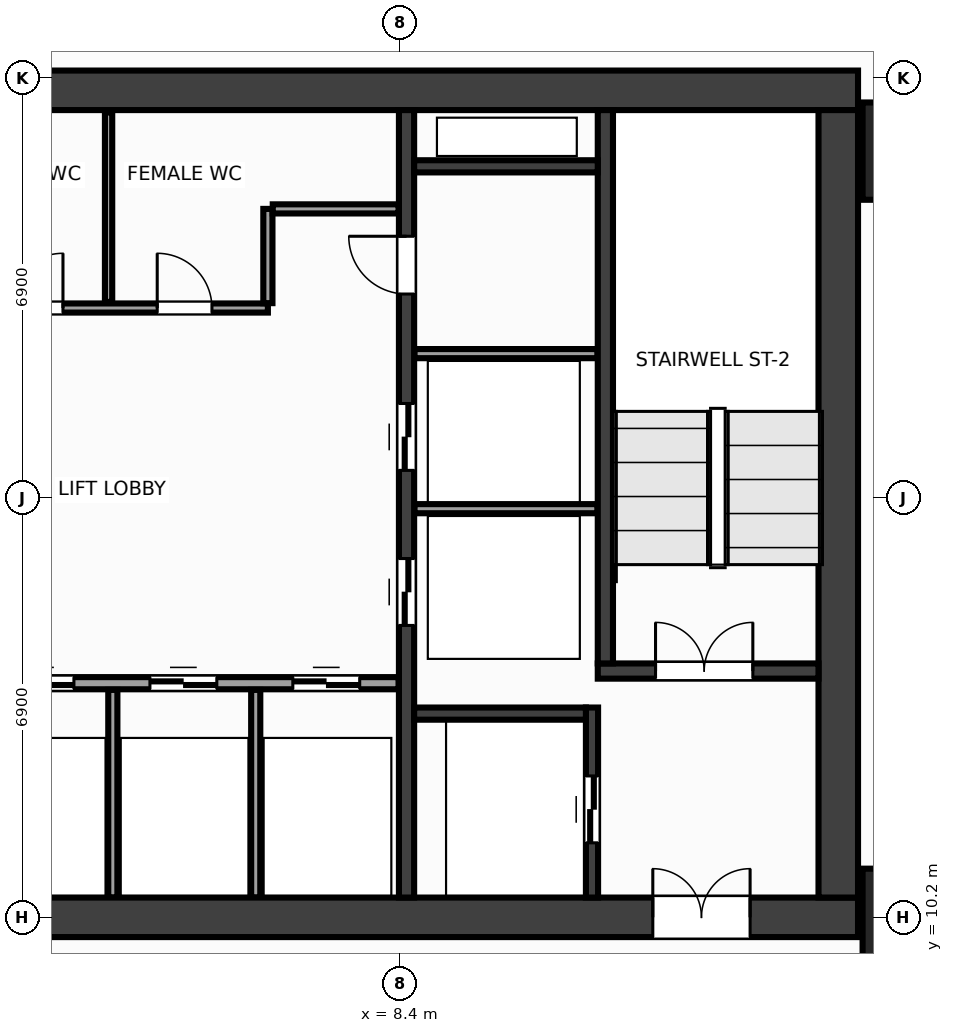
"""IFC4 building model, lengths in metres.
Left out: names, types, materials, properties, quantities, classifications, styles, units other than length and angle.
Written with IfcOpenShell. Run it as: python <this file> out.ifc"""

import sys

from ifc_helpers import new_model, si_unit, direction, frame, frame_2d, origin, origin_2d, place, context, subcontext, project, spatial, rectangle, extrude, source, transform, mapped, element, fill, save


model = new_model("IFC4")
c1 = context("Model", 3, precision=1e-05, world=origin(), true_north=direction((0.0, 1.0)))
c2 = subcontext(c1, "Body", "Model", "MODEL_VIEW")
j1 = project(units=[si_unit("LENGTHUNIT", "METRE"), si_unit("PLANEANGLEUNIT", "RADIAN")], contexts=[c1])
p1 = place(None, origin())
s1 = spatial("IfcSite", under=j1, at=p1, CompositionType="ELEMENT")
p2 = place(p1, origin())
s2 = spatial("IfcBuilding", under=s1, at=p2, CompositionType="ELEMENT")
p3 = place(p2, frame((0.0, 0.0, 131.6)))
s3 = spatial("IfcBuildingStorey", under=s2, at=p3, CompositionType="ELEMENT", Elevation=131.6)
m1 = source(origin(), c2, "Body", "SweptSolid", [
    extrude(rectangle(XDim=31.85, YDim=0.65, at=frame_2d((15.925, 0.0))), origin(), (0.0, 0.0, 1.0), 3.6),
])
p4 = place(p3, frame((-15.925, 23.8, 0.0), z_axis=(0.0, 0.0, 1.0), x_axis=(1.0, 0.0, 0.0)))
e1 = element("IfcWall", 1, at=p4, inside=s3, PredefinedType="SHEAR", context=c2, shape_type="MappedRepresentation", body=[
    mapped(m1, transform((0.0, 0.0, 0.0), x_axis=(1.0, 0.0, 0.0), y_axis=(0.0, 1.0, 0.0), z_axis=(0.0, 0.0, 1.0), scale=1.0)),
])
p5 = place(p3, frame((-15.925, 10.2, 0.0), z_axis=(0.0, 0.0, 1.0), x_axis=(1.0, 0.0, 0.0)))
e2 = element("IfcWall", 2, at=p5, inside=s3, PredefinedType="SHEAR", context=c2, shape_type="MappedRepresentation", body=[
    mapped(m1, transform((0.0, 0.0, 0.0), x_axis=(1.0, 0.0, 0.0), y_axis=(0.0, 1.0, 0.0), z_axis=(0.0, 0.0, 1.0), scale=1.0)),
])
p6 = place(p5, frame((1.775, 0.0, 0.0)))
e3 = element("IfcOpeningElement", 3, at=p6, cuts=e2, PredefinedType="OPENING", context=c2, shape_type="SweptSolid", body=[
    extrude(rectangle(XDim=1.6, YDim=2.15, at=frame_2d((0.8, 1.075))), frame((0.0, 0.337, 0.0), z_axis=(0.0, -1.0, 0.0), x_axis=(1.0, 0.0, 0.0)), (0.0, 0.0, 1.0), 0.674),
])
p7 = place(p5, frame((28.475, 0.0, 0.0)))
e4 = element("IfcOpeningElement", 4, at=p7, cuts=e2, PredefinedType="OPENING", context=c2, shape_type="SweptSolid", body=[
    extrude(rectangle(XDim=1.6, YDim=2.15, at=frame_2d((0.8, 1.075))), frame((0.0, 0.337, 0.0), z_axis=(0.0, -1.0, 0.0), x_axis=(1.0, 0.0, 0.0)), (0.0, 0.0, 1.0), 0.674),
])
p8 = place(p5, frame((15.175, 0.0, 0.0)))
e5 = element("IfcOpeningElement", 5, at=p8, cuts=e2, PredefinedType="OPENING", context=c2, shape_type="SweptSolid", body=[
    extrude(rectangle(XDim=1.5, YDim=2.2, at=frame_2d((0.75, 1.1))), frame((0.0, 0.337, 0.0), z_axis=(0.0, -1.0, 0.0), x_axis=(1.0, 0.0, 0.0)), (0.0, 0.0, 1.0), 0.674),
])
m2 = source(origin(), c2, "Body", "SweptSolid", [
    extrude(rectangle(XDim=12.95, YDim=0.65, at=frame_2d((6.475, 0.0))), origin(), (0.0, 0.0, 1.0), 3.6),
])
p9 = place(p3, frame((15.6, 10.525, 0.0), z_axis=(0.0, 0.0, 1.0), x_axis=(0.0, 1.0, 0.0)))
e6 = element("IfcWall", 6, at=p9, inside=s3, PredefinedType="SHEAR", context=c2, shape_type="MappedRepresentation", body=[
    mapped(m2, transform((0.0, 0.0, 0.0), x_axis=(1.0, 0.0, 0.0), y_axis=(0.0, 1.0, 0.0), z_axis=(0.0, 0.0, 1.0), scale=1.0)),
])
m3 = source(origin(), c2, "Body", "SweptSolid", [
    extrude(rectangle(XDim=12.95, YDim=0.25, at=frame_2d((6.475, 0.0))), origin(), (0.0, 0.0, 1.0), 3.6),
])
p10 = place(p3, frame((8.5, 10.525, 0.0), z_axis=(0.0, 0.0, 1.0), x_axis=(0.0, 1.0, 0.0)))
e7 = element("IfcWall", 7, at=p10, inside=s3, PredefinedType="SHEAR", context=c2, shape_type="MappedRepresentation", body=[
    mapped(m3, transform((0.0, 0.0, 0.0), x_axis=(1.0, 0.0, 0.0), y_axis=(0.0, 1.0, 0.0), z_axis=(0.0, 0.0, 1.0), scale=1.0)),
])
p11 = place(p10, frame((4.475, 0.0, 0.0)))
e8 = element("IfcOpeningElement", 8, at=p11, cuts=e7, PredefinedType="OPENING", context=c2, shape_type="SweptSolid", body=[
    extrude(rectangle(XDim=1.1, YDim=2.15, at=frame_2d((0.55, 1.075))), frame((0.0, 0.137, 0.0), z_axis=(0.0, -1.0, 0.0), x_axis=(1.0, 0.0, 0.0)), (0.0, 0.0, 1.0), 0.274),
])
p12 = place(p10, frame((7.025, 0.0, 0.0)))
e9 = element("IfcOpeningElement", 9, at=p12, cuts=e7, PredefinedType="OPENING", context=c2, shape_type="SweptSolid", body=[
    extrude(rectangle(XDim=1.1, YDim=2.15, at=frame_2d((0.55, 1.075))), frame((0.0, 0.137, 0.0), z_axis=(0.0, -1.0, 0.0), x_axis=(1.0, 0.0, 0.0)), (0.0, 0.0, 1.0), 0.274),
])
p13 = place(p10, frame((9.925, 0.0, 0.0)))
e10 = element("IfcOpeningElement", 10, at=p13, cuts=e7, PredefinedType="OPENING", context=c2, shape_type="SweptSolid", body=[
    extrude(rectangle(XDim=0.95, YDim=2.15, at=frame_2d((0.475, 1.075))), frame((0.0, 0.137, 0.0), z_axis=(0.0, -1.0, 0.0), x_axis=(1.0, 0.0, 0.0)), (0.0, 0.0, 1.0), 0.274),
])
m4 = source(origin(), c2, "Body", "SweptSolid", [
    extrude(rectangle(XDim=3.63, YDim=0.25, at=frame_2d((1.815, 0.0))), origin(), (0.0, 0.0, 1.0), 3.6),
])
p14 = place(p3, frame((11.645, 14.25, 0.0), z_axis=(0.0, 0.0, 1.0), x_axis=(1.0, 0.0, 0.0)))
e11 = element("IfcWall", 11, at=p14, inside=s3, PredefinedType="SHEAR", context=c2, shape_type="MappedRepresentation", body=[
    mapped(m4, transform((0.0, 0.0, 0.0), x_axis=(1.0, 0.0, 0.0), y_axis=(0.0, 1.0, 0.0), z_axis=(0.0, 0.0, 1.0), scale=1.0)),
])
p15 = place(p14, frame((0.95, 0.0, 0.0)))
e12 = element("IfcOpeningElement", 12, at=p15, cuts=e11, PredefinedType="OPENING", context=c2, shape_type="SweptSolid", body=[
    extrude(rectangle(XDim=1.6, YDim=2.15, at=frame_2d((0.8, 1.075))), frame((0.0, 0.137, 0.0), z_axis=(0.0, -1.0, 0.0), x_axis=(1.0, 0.0, 0.0)), (0.0, 0.0, 1.0), 0.274),
])
m5 = source(origin(), c2, "Body", "SweptSolid", [
    extrude(rectangle(XDim=9.1, YDim=0.25, at=frame_2d((4.55, 0.0))), origin(), (0.0, 0.0, 1.0), 3.6),
])
p16 = place(p3, frame((11.77, 14.375, 0.0), z_axis=(0.0, 0.0, 1.0), x_axis=(0.0, 1.0, 0.0)))
e13 = element("IfcWall", 13, at=p16, inside=s3, PredefinedType="SHEAR", context=c2, shape_type="MappedRepresentation", body=[
    mapped(m5, transform((0.0, 0.0, 0.0), x_axis=(1.0, 0.0, 0.0), y_axis=(0.0, 1.0, 0.0), z_axis=(0.0, 0.0, 1.0), scale=1.0)),
])
m6 = source(origin(), c2, "Body", "SweptSolid", [
    extrude(rectangle(XDim=3.125, YDim=0.2, at=frame_2d((1.562, 0.0))), origin(), (0.0, 0.0, 1.0), 3.6),
])
p17 = place(p3, frame((11.55, 10.525, 0.0), z_axis=(0.0, 0.0, 1.0), x_axis=(0.0, 1.0, 0.0)))
e14 = element("IfcWall", 14, at=p17, inside=s3, PredefinedType="SHEAR", context=c2, shape_type="MappedRepresentation", body=[
    mapped(m6, transform((0.0, 0.0, 0.0), x_axis=(1.0, 0.0, 0.0), y_axis=(0.0, 1.0, 0.0), z_axis=(0.0, 0.0, 1.0), scale=1.0)),
])
p18 = place(p17, frame((0.9, 0.0, 0.0)))
e15 = element("IfcOpeningElement", 15, at=p18, cuts=e14, PredefinedType="OPENING", context=c2, shape_type="SweptSolid", body=[
    extrude(rectangle(XDim=1.1, YDim=2.15, at=frame_2d((0.55, 1.075))), frame((0.0, 0.112, 0.0), z_axis=(0.0, -1.0, 0.0), x_axis=(1.0, 0.0, 0.0)), (0.0, 0.0, 1.0), 0.224),
])
m7 = source(origin(), c2, "Body", "SweptSolid", [
    extrude(rectangle(XDim=2.825, YDim=0.2, at=frame_2d((1.413, 0.0))), origin(), (0.0, 0.0, 1.0), 3.6),
])
p19 = place(p3, frame((8.625, 13.55, 0.0), z_axis=(0.0, 0.0, 1.0), x_axis=(1.0, 0.0, 0.0)))
e16 = element("IfcWall", 16, at=p19, inside=s3, PredefinedType="SHEAR", context=c2, shape_type="MappedRepresentation", body=[
    mapped(m7, transform((0.0, 0.0, 0.0), x_axis=(1.0, 0.0, 0.0), y_axis=(0.0, 1.0, 0.0), z_axis=(0.0, 0.0, 1.0), scale=1.0)),
])
m8 = source(origin(), c2, "Body", "SweptSolid", [
    extrude(rectangle(XDim=3.02, YDim=0.2, at=frame_2d((1.51, 0.0))), origin(), (0.0, 0.0, 1.0), 3.6),
])
p20 = place(p3, frame((8.625, 22.55, 0.0), z_axis=(0.0, 0.0, 1.0), x_axis=(1.0, 0.0, 0.0)))
e17 = element("IfcWall", 17, at=p20, inside=s3, PredefinedType="SHEAR", context=c2, shape_type="MappedRepresentation", body=[
    mapped(m8, transform((0.0, 0.0, 0.0), x_axis=(1.0, 0.0, 0.0), y_axis=(0.0, 1.0, 0.0), z_axis=(0.0, 0.0, 1.0), scale=1.0)),
])
m9 = source(origin(), c2, "Body", "SweptSolid", [
    extrude(rectangle(XDim=1.6, YDim=1.6, at=origin_2d()), origin(), (0.0, 0.0, 1.0), 3.6),
])
for number, where, z_axis, x_axis in (
    (18, (16.8, 10.2, 0.0), (0.0, 0.0, 1.0), (1.0, 0.0, 0.0)),
    (19, (16.8, 22.8, 0.0), (0.0, 0.0, 1.0), (1.0, 0.0, 0.0)),
):
    element("IfcColumn", number, at=place(p3, frame(where, z_axis=z_axis, x_axis=x_axis)), inside=s3, PredefinedType="COLUMN", context=c2, shape_type="MappedRepresentation", body=[
        mapped(m9, transform((0.0, 0.0, 0.0), x_axis=(1.0, 0.0, 0.0), y_axis=(0.0, 1.0, 0.0), z_axis=(0.0, 0.0, 1.0), scale=1.0)),
    ])
m10 = source(origin(), c2, "Body", "SweptSolid", [
    extrude(rectangle(XDim=3.01, YDim=0.15, at=frame_2d((1.505, 0.0))), origin(), (0.0, 0.0, 1.0), 3.38),
])
for number, where, z_axis, x_axis in (
    (20, (8.63, 16.92, 0.0), (0.0, 0.0, 1.0), (1.0, 0.0, 0.0)),
    (21, (8.63, 19.47, 0.0), (0.0, 0.0, 1.0), (1.0, 0.0, 0.0)),
):
    element("IfcWall", number, at=place(p3, frame(where, z_axis=z_axis, x_axis=x_axis)), inside=s3, PredefinedType="PARTITIONING", context=c2, shape_type="MappedRepresentation", body=[
        mapped(m10, transform((0.0, 0.0, 0.0), x_axis=(1.0, 0.0, 0.0), y_axis=(0.0, 1.0, 0.0), z_axis=(0.0, 0.0, 1.0), scale=1.0)),
    ])
m11 = source(origin(), c2, "Body", "SweptSolid", [
    extrude(rectangle(XDim=7.07, YDim=0.2, at=frame_2d((3.535, 0.0))), origin(), (0.0, 0.0, 1.0), 3.38),
])
p21 = place(p3, frame((1.3, 14.05, 0.0), z_axis=(0.0, 0.0, 1.0), x_axis=(1.0, 0.0, 0.0)))
e22 = element("IfcWall", 22, at=p21, inside=s3, PredefinedType="PARTITIONING", context=c2, shape_type="MappedRepresentation", body=[
    mapped(m11, transform((0.0, 0.0, 0.0), x_axis=(1.0, 0.0, 0.0), y_axis=(0.0, 1.0, 0.0), z_axis=(0.0, 0.0, 1.0), scale=1.0)),
])
p22 = place(p21, frame((0.63, 0.0, 0.0)))
e23 = element("IfcOpeningElement", 23, at=p22, cuts=e22, PredefinedType="OPENING", context=c2, shape_type="SweptSolid", body=[
    extrude(rectangle(XDim=1.1, YDim=2.15, at=frame_2d((0.55, 1.075))), frame((0.0, 0.112, 0.0), z_axis=(0.0, -1.0, 0.0), x_axis=(1.0, 0.0, 0.0)), (0.0, 0.0, 1.0), 0.224),
])
p23 = place(p21, frame((2.98, 0.0, 0.0)))
e24 = element("IfcOpeningElement", 24, at=p23, cuts=e22, PredefinedType="OPENING", context=c2, shape_type="SweptSolid", body=[
    extrude(rectangle(XDim=1.1, YDim=2.15, at=frame_2d((0.55, 1.075))), frame((0.0, 0.112, 0.0), z_axis=(0.0, -1.0, 0.0), x_axis=(1.0, 0.0, 0.0)), (0.0, 0.0, 1.0), 0.224),
])
p24 = place(p21, frame((5.33, 0.0, 0.0)))
e25 = element("IfcOpeningElement", 25, at=p24, cuts=e22, PredefinedType="OPENING", context=c2, shape_type="SweptSolid", body=[
    extrude(rectangle(XDim=1.1, YDim=2.15, at=frame_2d((0.55, 1.075))), frame((0.0, 0.112, 0.0), z_axis=(0.0, -1.0, 0.0), x_axis=(1.0, 0.0, 0.0)), (0.0, 0.0, 1.0), 0.224),
])
m12 = source(origin(), c2, "Body", "SweptSolid", [
    extrude(rectangle(XDim=14.59, YDim=0.15, at=frame_2d((7.295, 0.0))), origin(), (0.0, 0.0, 1.0), 3.38),
])
p25 = place(p3, frame((-8.37, 20.22, 0.0), z_axis=(0.0, 0.0, 1.0), x_axis=(1.0, 0.0, 0.0)))
e26 = element("IfcWall", 26, at=p25, inside=s3, PredefinedType="PARTITIONING", context=c2, shape_type="MappedRepresentation", body=[
    mapped(m12, transform((0.0, 0.0, 0.0), x_axis=(1.0, 0.0, 0.0), y_axis=(0.0, 1.0, 0.0), z_axis=(0.0, 0.0, 1.0), scale=1.0)),
])
p26 = place(p25, frame((4.36, 0.0, 0.0)))
e27 = element("IfcOpeningElement", 27, at=p26, cuts=e26, PredefinedType="OPENING", context=c2, shape_type="SweptSolid", body=[
    extrude(rectangle(XDim=0.9, YDim=2.15, at=frame_2d((0.45, 1.075))), frame((0.0, 0.087, 0.0), z_axis=(0.0, -1.0, 0.0), x_axis=(1.0, 0.0, 0.0)), (0.0, 0.0, 1.0), 0.174),
])
p27 = place(p25, frame((10.32, 0.0, 0.0)))
e28 = element("IfcOpeningElement", 28, at=p27, cuts=e26, PredefinedType="OPENING", context=c2, shape_type="SweptSolid", body=[
    extrude(rectangle(XDim=0.9, YDim=2.15, at=frame_2d((0.45, 1.075))), frame((0.0, 0.087, 0.0), z_axis=(0.0, -1.0, 0.0), x_axis=(1.0, 0.0, 0.0)), (0.0, 0.0, 1.0), 0.174),
])
p28 = place(p25, frame((12.77, 0.0, 0.0)))
e29 = element("IfcOpeningElement", 29, at=p28, cuts=e26, PredefinedType="OPENING", context=c2, shape_type="SweptSolid", body=[
    extrude(rectangle(XDim=0.9, YDim=2.15, at=frame_2d((0.45, 1.075))), frame((0.0, 0.087, 0.0), z_axis=(0.0, -1.0, 0.0), x_axis=(1.0, 0.0, 0.0)), (0.0, 0.0, 1.0), 0.174),
])
m13 = source(origin(), c2, "Body", "SweptSolid", [
    extrude(rectangle(XDim=1.55, YDim=0.15, at=frame_2d((0.775, 0.0))), origin(), (0.0, 0.0, 1.0), 3.38),
])
p29 = place(p3, frame((6.22, 20.3, 0.0), z_axis=(0.0, 0.0, 1.0), x_axis=(0.0, 1.0, 0.0)))
e30 = element("IfcWall", 30, at=p29, inside=s3, PredefinedType="PARTITIONING", context=c2, shape_type="MappedRepresentation", body=[
    mapped(m13, transform((0.0, 0.0, 0.0), x_axis=(1.0, 0.0, 0.0), y_axis=(0.0, 1.0, 0.0), z_axis=(0.0, 0.0, 1.0), scale=1.0)),
])
m14 = source(origin(), c2, "Body", "SweptSolid", [
    extrude(rectangle(XDim=2.07, YDim=0.15, at=frame_2d((1.035, 0.0))), origin(), (0.0, 0.0, 1.0), 3.38),
])
p30 = place(p3, frame((6.3, 21.85, 0.0), z_axis=(0.0, 0.0, 1.0), x_axis=(1.0, 0.0, 0.0)))
e31 = element("IfcWall", 31, at=p30, inside=s3, PredefinedType="PARTITIONING", context=c2, shape_type="MappedRepresentation", body=[
    mapped(m14, transform((0.0, 0.0, 0.0), x_axis=(1.0, 0.0, 0.0), y_axis=(0.0, 1.0, 0.0), z_axis=(0.0, 0.0, 1.0), scale=1.0)),
])
m15 = source(origin(), c2, "Body", "SweptSolid", [
    extrude(rectangle(XDim=3.415, YDim=0.15, at=frame_2d((1.708, 0.0))), origin(), (0.0, 0.0, 1.0), 3.38),
])
for number, where, z_axis, x_axis in (
    (32, (3.67, 10.525, 0.0), (0.0, 0.0, 1.0), (0.0, 1.0, 0.0)),
    (33, (6.02, 10.525, 0.0), (0.0, 0.0, 1.0), (0.0, 1.0, 0.0)),
):
    element("IfcWall", number, at=place(p3, frame(where, z_axis=z_axis, x_axis=x_axis)), inside=s3, PredefinedType="PARTITIONING", context=c2, shape_type="MappedRepresentation", body=[
        mapped(m15, transform((0.0, 0.0, 0.0), x_axis=(1.0, 0.0, 0.0), y_axis=(0.0, 1.0, 0.0), z_axis=(0.0, 0.0, 1.0), scale=1.0)),
    ])
m16 = source(origin(), c2, "Body", "SweptSolid", [
    extrude(rectangle(XDim=3.115, YDim=0.12, at=frame_2d((1.558, 0.0))), origin(), (0.0, 0.0, 1.0), 3.38),
])
p31 = place(p3, frame((3.6, 20.32, 0.0), z_axis=(0.0, 0.0, 1.0), x_axis=(0.0, 1.0, 0.0)))
e34 = element("IfcWall", 34, at=p31, inside=s3, PredefinedType="PARTITIONING", context=c2, shape_type="MappedRepresentation", body=[
    mapped(m16, transform((0.0, 0.0, 0.0), x_axis=(1.0, 0.0, 0.0), y_axis=(0.0, 1.0, 0.0), z_axis=(0.0, 0.0, 1.0), scale=1.0)),
])
m17 = source(origin(), c2, "Body", "SweptSolid", [
    extrude(rectangle(XDim=1.6, YDim=2.15, at=frame_2d((0.8, 1.075))), frame((0.0, 0.025, 0.0), z_axis=(0.0, -1.0, 0.0), x_axis=(1.0, 0.0, 0.0)), (0.0, 0.0, 1.0), 0.05),
])
p32 = place(p15, origin())
e35 = element("IfcDoor", 35, at=p32, inside=s3, OperationType="DOUBLE_DOOR_SINGLE_SWING", PredefinedType="DOOR", context=c2, shape_type="MappedRepresentation", body=[
    mapped(m17, transform((0.0, 0.0, 0.0), x_axis=(1.0, 0.0, 0.0), y_axis=(0.0, 1.0, 0.0), z_axis=(0.0, 0.0, 1.0), scale=1.0)),
])
fill(e12, e35)
p33 = place(p7, origin())
e36 = element("IfcDoor", 36, at=p33, inside=s3, OperationType="DOUBLE_DOOR_SINGLE_SWING", PredefinedType="DOOR", context=c2, shape_type="MappedRepresentation", body=[
    mapped(m17, transform((0.0, 0.0, 0.0), x_axis=(1.0, 0.0, 0.0), y_axis=(0.0, 1.0, 0.0), z_axis=(0.0, 0.0, 1.0), scale=1.0)),
])
fill(e4, e36)
m18 = source(origin(), c2, "Body", "SweptSolid", [
    extrude(rectangle(XDim=1.1, YDim=2.15, at=frame_2d((0.55, 1.075))), frame((0.0, 0.025, 0.0), z_axis=(0.0, -1.0, 0.0), x_axis=(1.0, 0.0, 0.0)), (0.0, 0.0, 1.0), 0.05),
])
p34 = place(p18, origin())
e37 = element("IfcDoor", 37, at=p34, inside=s3, OperationType="DOUBLE_DOOR_SLIDING", PredefinedType="DOOR", context=c2, shape_type="MappedRepresentation", body=[
    mapped(m18, transform((0.0, 0.0, 0.0), x_axis=(1.0, 0.0, 0.0), y_axis=(0.0, 1.0, 0.0), z_axis=(0.0, 0.0, 1.0), scale=1.0)),
])
fill(e15, e37)
p35 = place(p11, origin())
e38 = element("IfcDoor", 38, at=p35, inside=s3, OperationType="DOUBLE_DOOR_SLIDING", PredefinedType="DOOR", context=c2, shape_type="MappedRepresentation", body=[
    mapped(m18, transform((0.0, 0.0, 0.0), x_axis=(1.0, 0.0, 0.0), y_axis=(0.0, 1.0, 0.0), z_axis=(0.0, 0.0, 1.0), scale=1.0)),
])
fill(e8, e38)
p36 = place(p12, origin())
e39 = element("IfcDoor", 39, at=p36, inside=s3, OperationType="DOUBLE_DOOR_SLIDING", PredefinedType="DOOR", context=c2, shape_type="MappedRepresentation", body=[
    mapped(m18, transform((0.0, 0.0, 0.0), x_axis=(1.0, 0.0, 0.0), y_axis=(0.0, 1.0, 0.0), z_axis=(0.0, 0.0, 1.0), scale=1.0)),
])
fill(e9, e39)
m19 = source(origin(), c2, "Body", "SweptSolid", [
    extrude(rectangle(XDim=0.95, YDim=2.15, at=frame_2d((0.475, 1.075))), frame((0.0, 0.025, 0.0), z_axis=(0.0, -1.0, 0.0), x_axis=(1.0, 0.0, 0.0)), (0.0, 0.0, 1.0), 0.05),
])
p37 = place(p13, origin())
e40 = element("IfcDoor", 40, at=p37, inside=s3, OperationType="SINGLE_SWING_RIGHT", PredefinedType="DOOR", context=c2, shape_type="MappedRepresentation", body=[
    mapped(m19, transform((0.0, 0.0, 0.0), x_axis=(1.0, 0.0, 0.0), y_axis=(0.0, 1.0, 0.0), z_axis=(0.0, 0.0, 1.0), scale=1.0)),
])
fill(e10, e40)
p38 = place(p22, origin())
e41 = element("IfcDoor", 41, at=p38, inside=s3, OperationType="DOUBLE_DOOR_SLIDING", PredefinedType="DOOR", context=c2, shape_type="MappedRepresentation", body=[
    mapped(m18, transform((0.0, 0.0, 0.0), x_axis=(1.0, 0.0, 0.0), y_axis=(0.0, 1.0, 0.0), z_axis=(0.0, 0.0, 1.0), scale=1.0)),
])
fill(e23, e41)
p39 = place(p23, origin())
e42 = element("IfcDoor", 42, at=p39, inside=s3, OperationType="DOUBLE_DOOR_SLIDING", PredefinedType="DOOR", context=c2, shape_type="MappedRepresentation", body=[
    mapped(m18, transform((0.0, 0.0, 0.0), x_axis=(1.0, 0.0, 0.0), y_axis=(0.0, 1.0, 0.0), z_axis=(0.0, 0.0, 1.0), scale=1.0)),
])
fill(e24, e42)
p40 = place(p24, origin())
e43 = element("IfcDoor", 43, at=p40, inside=s3, OperationType="DOUBLE_DOOR_SLIDING", PredefinedType="DOOR", context=c2, shape_type="MappedRepresentation", body=[
    mapped(m18, transform((0.0, 0.0, 0.0), x_axis=(1.0, 0.0, 0.0), y_axis=(0.0, 1.0, 0.0), z_axis=(0.0, 0.0, 1.0), scale=1.0)),
])
fill(e25, e43)
m20 = source(origin(), c2, "Body", "SweptSolid", [
    extrude(rectangle(XDim=0.9, YDim=2.15, at=frame_2d((0.45, 1.075))), frame((0.0, 0.025, 0.0), z_axis=(0.0, -1.0, 0.0), x_axis=(1.0, 0.0, 0.0)), (0.0, 0.0, 1.0), 0.05),
])
p41 = place(p27, origin())
e44 = element("IfcDoor", 44, at=p41, inside=s3, OperationType="SINGLE_SWING_RIGHT", PredefinedType="DOOR", context=c2, shape_type="MappedRepresentation", body=[
    mapped(m20, transform((0.0, 0.0, 0.0), x_axis=(1.0, 0.0, 0.0), y_axis=(0.0, 1.0, 0.0), z_axis=(0.0, 0.0, 1.0), scale=1.0)),
])
fill(e28, e44)
p42 = place(p28, origin())
e45 = element("IfcDoor", 45, at=p42, inside=s3, OperationType="SINGLE_SWING_LEFT", PredefinedType="DOOR", context=c2, shape_type="MappedRepresentation", body=[
    mapped(m20, transform((0.0, 0.0, 0.0), x_axis=(1.0, 0.0, 0.0), y_axis=(0.0, 1.0, 0.0), z_axis=(0.0, 0.0, 1.0), scale=1.0)),
])
fill(e29, e45)
save(model, sys.argv[1])
